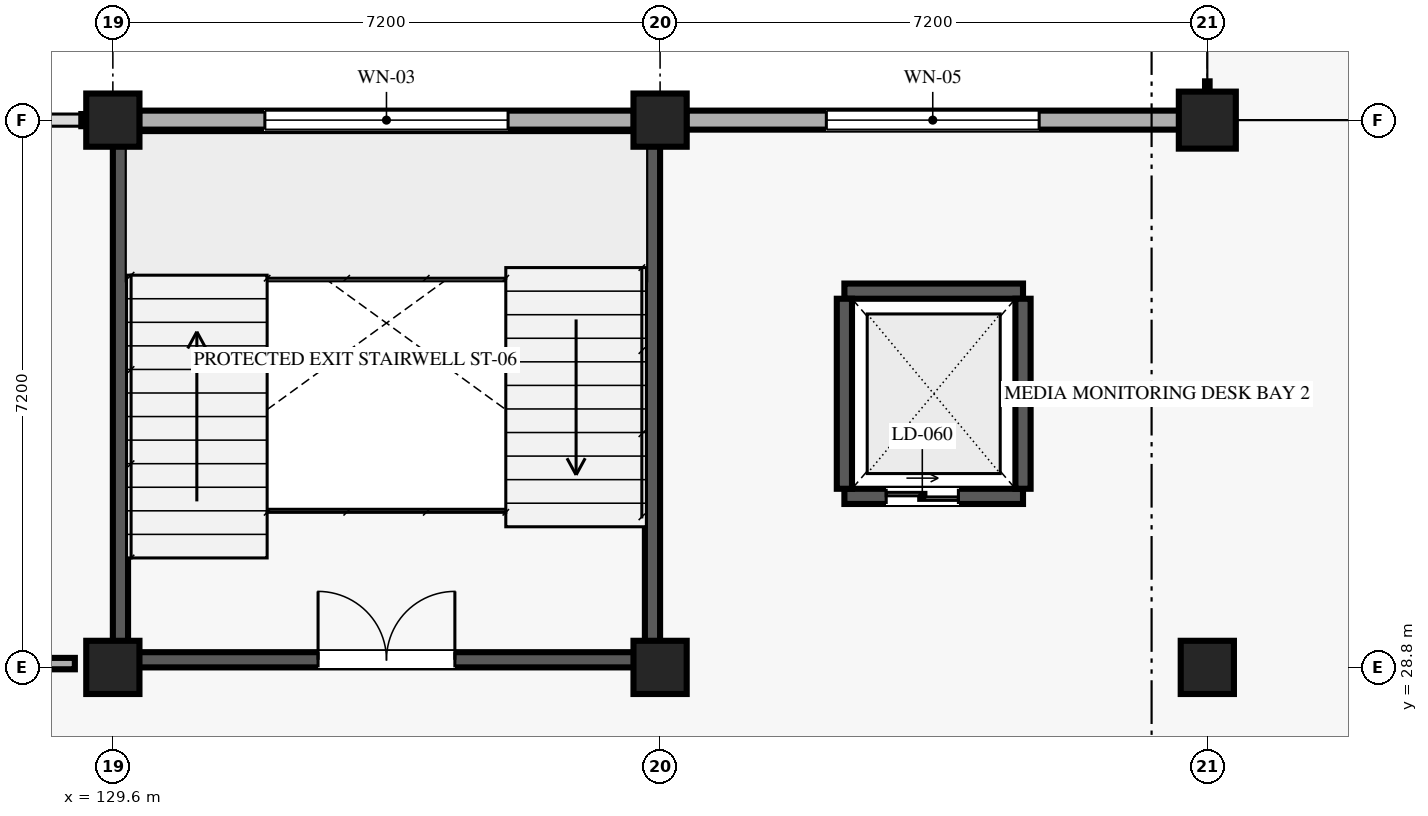
"""IFC4 building model, lengths in metres.
Left out: names, types, materials, properties, quantities, classifications, styles, units other than length and angle.
Written with IfcOpenShell. Run it as: python <this file> out.ifc"""

import sys

from ifc_helpers import new_model, si_unit, direction, frame, frame_2d, origin, origin_2d, place, context, subcontext, project, spatial, rectangle, extrude, element, fill, save


model = new_model("IFC4")
c1 = context("Model", 3, precision=1e-05, world=origin(), true_north=direction((0.0, 1.0)))
c2 = subcontext(c1, "Body", "Model", "MODEL_VIEW")
j1 = project(units=[si_unit("LENGTHUNIT", "METRE"), si_unit("PLANEANGLEUNIT", "RADIAN")], contexts=[c1])
p1 = place(None, origin())
s1 = spatial("IfcSite", under=j1, at=p1, CompositionType="ELEMENT")
p2 = place(p1, origin())
s2 = spatial("IfcBuilding", under=s1, at=p2, CompositionType="ELEMENT")
p3 = place(p2, frame((0.0, 0.0, 9.45)))
s3 = spatial("IfcBuildingStorey", under=s2, at=p3, CompositionType="ELEMENT", Elevation=9.45)
for number, where, z_axis, x_axis in (
    (1, (129.6, 28.8, 0.0), (0.0, 0.0, 1.0), (1.0, 0.0, 0.0)),
    (2, (129.6, 36.0, 0.0), (0.0, 0.0, 1.0), (1.0, 0.0, 0.0)),
    (3, (136.8, 28.8, 0.0), (0.0, 0.0, 1.0), (1.0, 0.0, 0.0)),
    (4, (136.8, 36.0, 0.0), (0.0, 0.0, 1.0), (1.0, 0.0, 0.0)),
    (5, (144.0, 28.8, 0.0), (0.0, 0.0, 1.0), (1.0, 0.0, 0.0)),
):
    element("IfcColumn", number, at=place(p3, frame(where, z_axis=z_axis, x_axis=x_axis)), inside=s3, PredefinedType="COLUMN", context=c2, shape_type="SweptSolid", body=[
        extrude(rectangle(XDim=0.7, YDim=0.7, at=origin_2d()), origin(), (0.0, 0.0, 1.0), 4.05),
    ])
p4 = place(p3, frame((144.0, 36.0, 0.0), z_axis=(0.0, 0.0, 1.0), x_axis=(1.0, 0.0, 0.0)))
e6 = element("IfcColumn", 6, at=p4, inside=s3, PredefinedType="COLUMN", context=c2, shape_type="SweptSolid", body=[
    extrude(rectangle(XDim=0.75, YDim=0.75, at=origin_2d()), origin(), (0.0, 0.0, 1.0), 4.05),
])
p5 = place(p3, frame((129.945, 36.0, 0.0), z_axis=(0.0, 0.0, 1.0), x_axis=(1.0, 0.0, 0.0)))
e7 = element("IfcWall", 7, at=p5, inside=s3, PredefinedType="SOLIDWALL", context=c2, shape_type="SweptSolid", body=[
    extrude(rectangle(XDim=6.51, YDim=0.25, at=frame_2d((3.255, 0.0))), origin(), (0.0, 0.0, 1.0), 3.195),
])
p6 = place(p5, frame((1.655, 0.0, 0.85)))
e8 = element("IfcOpeningElement", 8, at=p6, cuts=e7, PredefinedType="OPENING", context=c2, shape_type="SweptSolid", body=[
    extrude(rectangle(XDim=3.2, YDim=1.95, at=frame_2d((1.6, 0.975))), frame((0.0, 0.135, 0.0), z_axis=(0.0, -1.0, 0.0), x_axis=(1.0, 0.0, 0.0)), (0.0, 0.0, 1.0), 0.27),
])
p7 = place(p3, frame((137.145, 36.0, 0.0), z_axis=(0.0, 0.0, 1.0), x_axis=(1.0, 0.0, 0.0)))
e9 = element("IfcWall", 9, at=p7, inside=s3, PredefinedType="SOLIDWALL", context=c2, shape_type="SweptSolid", body=[
    extrude(rectangle(XDim=6.485, YDim=0.25, at=frame_2d((3.242, 0.0))), origin(), (0.0, 0.0, 1.0), 3.195),
])
p8 = place(p7, frame((1.843, 0.0, 0.85)))
e10 = element("IfcOpeningElement", 10, at=p8, cuts=e9, PredefinedType="OPENING", context=c2, shape_type="SweptSolid", body=[
    extrude(rectangle(XDim=2.8, YDim=1.85, at=frame_2d((1.4, 0.925))), frame((0.0, 0.135, 0.0), z_axis=(0.0, -1.0, 0.0), x_axis=(1.0, 0.0, 0.0)), (0.0, 0.0, 1.0), 0.27),
])
p9 = place(p3, frame((129.8, 28.9, 0.0), z_axis=(0.0, 0.0, 1.0), x_axis=(1.0, 0.0, 0.0)))
e11 = element("IfcWall", 11, at=p9, inside=s3, PredefinedType="SHEAR", context=c2, shape_type="SweptSolid", body=[
    extrude(rectangle(XDim=6.8, YDim=0.2, at=frame_2d((3.4, 0.0))), origin(), (0.0, 0.0, 1.0), 3.81),
])
p10 = place(p9, frame((2.5, 0.0, 0.0)))
e12 = element("IfcOpeningElement", 12, at=p10, cuts=e11, PredefinedType="OPENING", context=c2, shape_type="SweptSolid", body=[
    extrude(rectangle(XDim=1.8, YDim=2.2, at=frame_2d((0.9, 1.1))), frame((0.0, 0.11, 0.0), z_axis=(0.0, -1.0, 0.0), x_axis=(1.0, 0.0, 0.0)), (0.0, 0.0, 1.0), 0.22),
])
for number, where, z_axis, x_axis in (
    (13, (129.7, 29.0, 0.0), (0.0, 0.0, 1.0), (0.0, 1.0, 0.0)),
    (14, (136.7, 29.0, 0.0), (0.0, 0.0, 1.0), (0.0, 1.0, 0.0)),
):
    element("IfcWall", number, at=place(p3, frame(where, z_axis=z_axis, x_axis=x_axis)), inside=s3, PredefinedType="SHEAR", context=c2, shape_type="SweptSolid", body=[
        extrude(rectangle(XDim=6.8, YDim=0.2, at=frame_2d((3.4, 0.0))), origin(), (0.0, 0.0, 1.0), 3.81),
    ])
p11 = place(p3, frame((139.225, 31.05, 0.0), z_axis=(0.0, 0.0, 1.0), x_axis=(1.0, 0.0, 0.0)))
e15 = element("IfcWall", 15, at=p11, inside=s3, PredefinedType="SHEAR", context=c2, shape_type="SweptSolid", body=[
    extrude(rectangle(XDim=2.35, YDim=0.2, at=frame_2d((1.175, 0.0))), origin(), (0.0, 0.0, 1.0), 3.81),
])
p12 = place(p11, frame((0.55, 0.0, 0.0)))
e16 = element("IfcOpeningElement", 16, at=p12, cuts=e15, PredefinedType="OPENING", context=c2, shape_type="SweptSolid", body=[
    extrude(rectangle(XDim=0.95, YDim=2.1, at=frame_2d((0.475, 1.05))), frame((0.0, 0.11, 0.0), z_axis=(0.0, -1.0, 0.0), x_axis=(1.0, 0.0, 0.0)), (0.0, 0.0, 1.0), 0.22),
])
p13 = place(p3, frame((139.225, 33.75, 0.0), z_axis=(0.0, 0.0, 1.0), x_axis=(1.0, 0.0, 0.0)))
e17 = element("IfcWall", 17, at=p13, inside=s3, PredefinedType="SHEAR", context=c2, shape_type="SweptSolid", body=[
    extrude(rectangle(XDim=2.35, YDim=0.2, at=frame_2d((1.175, 0.0))), origin(), (0.0, 0.0, 1.0), 3.81),
])
for number, where, z_axis, x_axis in (
    (18, (139.225, 31.15, 0.0), (0.0, 0.0, 1.0), (0.0, 1.0, 0.0)),
    (19, (141.575, 31.15, 0.0), (0.0, 0.0, 1.0), (0.0, 1.0, 0.0)),
):
    element("IfcWall", number, at=place(p3, frame(where, z_axis=z_axis, x_axis=x_axis)), inside=s3, PredefinedType="SHEAR", context=c2, shape_type="SweptSolid", body=[
        extrude(rectangle(XDim=2.5, YDim=0.2, at=frame_2d((1.25, 0.0))), origin(), (0.0, 0.0, 1.0), 3.81),
    ])
p14 = place(p3, frame((108.65, 28.85, 0.0), z_axis=(0.0, 0.0, 1.0), x_axis=(1.0, 0.0, 0.0)))
e20 = element("IfcWall", 20, at=p14, inside=s3, PredefinedType="PARTITIONING", context=c2, shape_type="SweptSolid", body=[
    extrude(rectangle(XDim=20.45, YDim=0.15, at=frame_2d((10.225, 0.0))), origin(), (0.0, 0.0, 1.0), 3.2),
])
p15 = place(p14, frame((9.574, 0.0, 0.0)))
e21 = element("IfcOpeningElement", 21, at=p15, cuts=e20, PredefinedType="OPENING", context=c2, shape_type="SweptSolid", body=[
    extrude(rectangle(XDim=1.05, YDim=2.15, at=frame_2d((0.525, 1.075))), frame((0.0, 0.085, 0.0), z_axis=(0.0, -1.0, 0.0), x_axis=(1.0, 0.0, 0.0)), (0.0, 0.0, 1.0), 0.17),
])
p16 = place(p6, origin())
e22 = element("IfcWindow", 22, at=p16, inside=s3, PartitioningType="SINGLE_PANEL", PredefinedType="WINDOW", context=c2, shape_type="SweptSolid", body=[
    extrude(rectangle(XDim=3.2, YDim=1.95, at=frame_2d((1.6, 0.975))), frame((0.0, 0.03, 0.0), z_axis=(0.0, -1.0, 0.0), x_axis=(1.0, 0.0, 0.0)), (0.0, 0.0, 1.0), 0.06),
])
fill(e8, e22)
p17 = place(p8, origin())
e23 = element("IfcWindow", 23, at=p17, inside=s3, PartitioningType="SINGLE_PANEL", PredefinedType="WINDOW", context=c2, shape_type="SweptSolid", body=[
    extrude(rectangle(XDim=2.8, YDim=1.85, at=frame_2d((1.4, 0.925))), frame((0.0, 0.03, 0.0), z_axis=(0.0, -1.0, 0.0), x_axis=(1.0, 0.0, 0.0)), (0.0, 0.0, 1.0), 0.06),
])
fill(e10, e23)
p18 = place(p10, origin())
e24 = element("IfcDoor", 24, at=p18, inside=s3, OperationType="DOUBLE_DOOR_SINGLE_SWING", PredefinedType="DOOR", context=c2, shape_type="SweptSolid", body=[
    extrude(rectangle(XDim=1.8, YDim=2.2, at=frame_2d((0.9, 1.1))), frame((0.0, 0.025, 0.0), z_axis=(0.0, -1.0, 0.0), x_axis=(1.0, 0.0, 0.0)), (0.0, 0.0, 1.0), 0.05),
])
fill(e12, e24)
p19 = place(p12, origin())
e25 = element("IfcDoor", 25, at=p19, inside=s3, OperationType="DOUBLE_DOOR_SLIDING", PredefinedType="DOOR", context=c2, shape_type="SweptSolid", body=[
    extrude(rectangle(XDim=0.95, YDim=2.1, at=frame_2d((0.475, 1.05))), frame((0.0, 0.025, 0.0), z_axis=(0.0, -1.0, 0.0), x_axis=(1.0, 0.0, 0.0)), (0.0, 0.0, 1.0), 0.05),
])
fill(e16, e25)
save(model, sys.argv[1])
